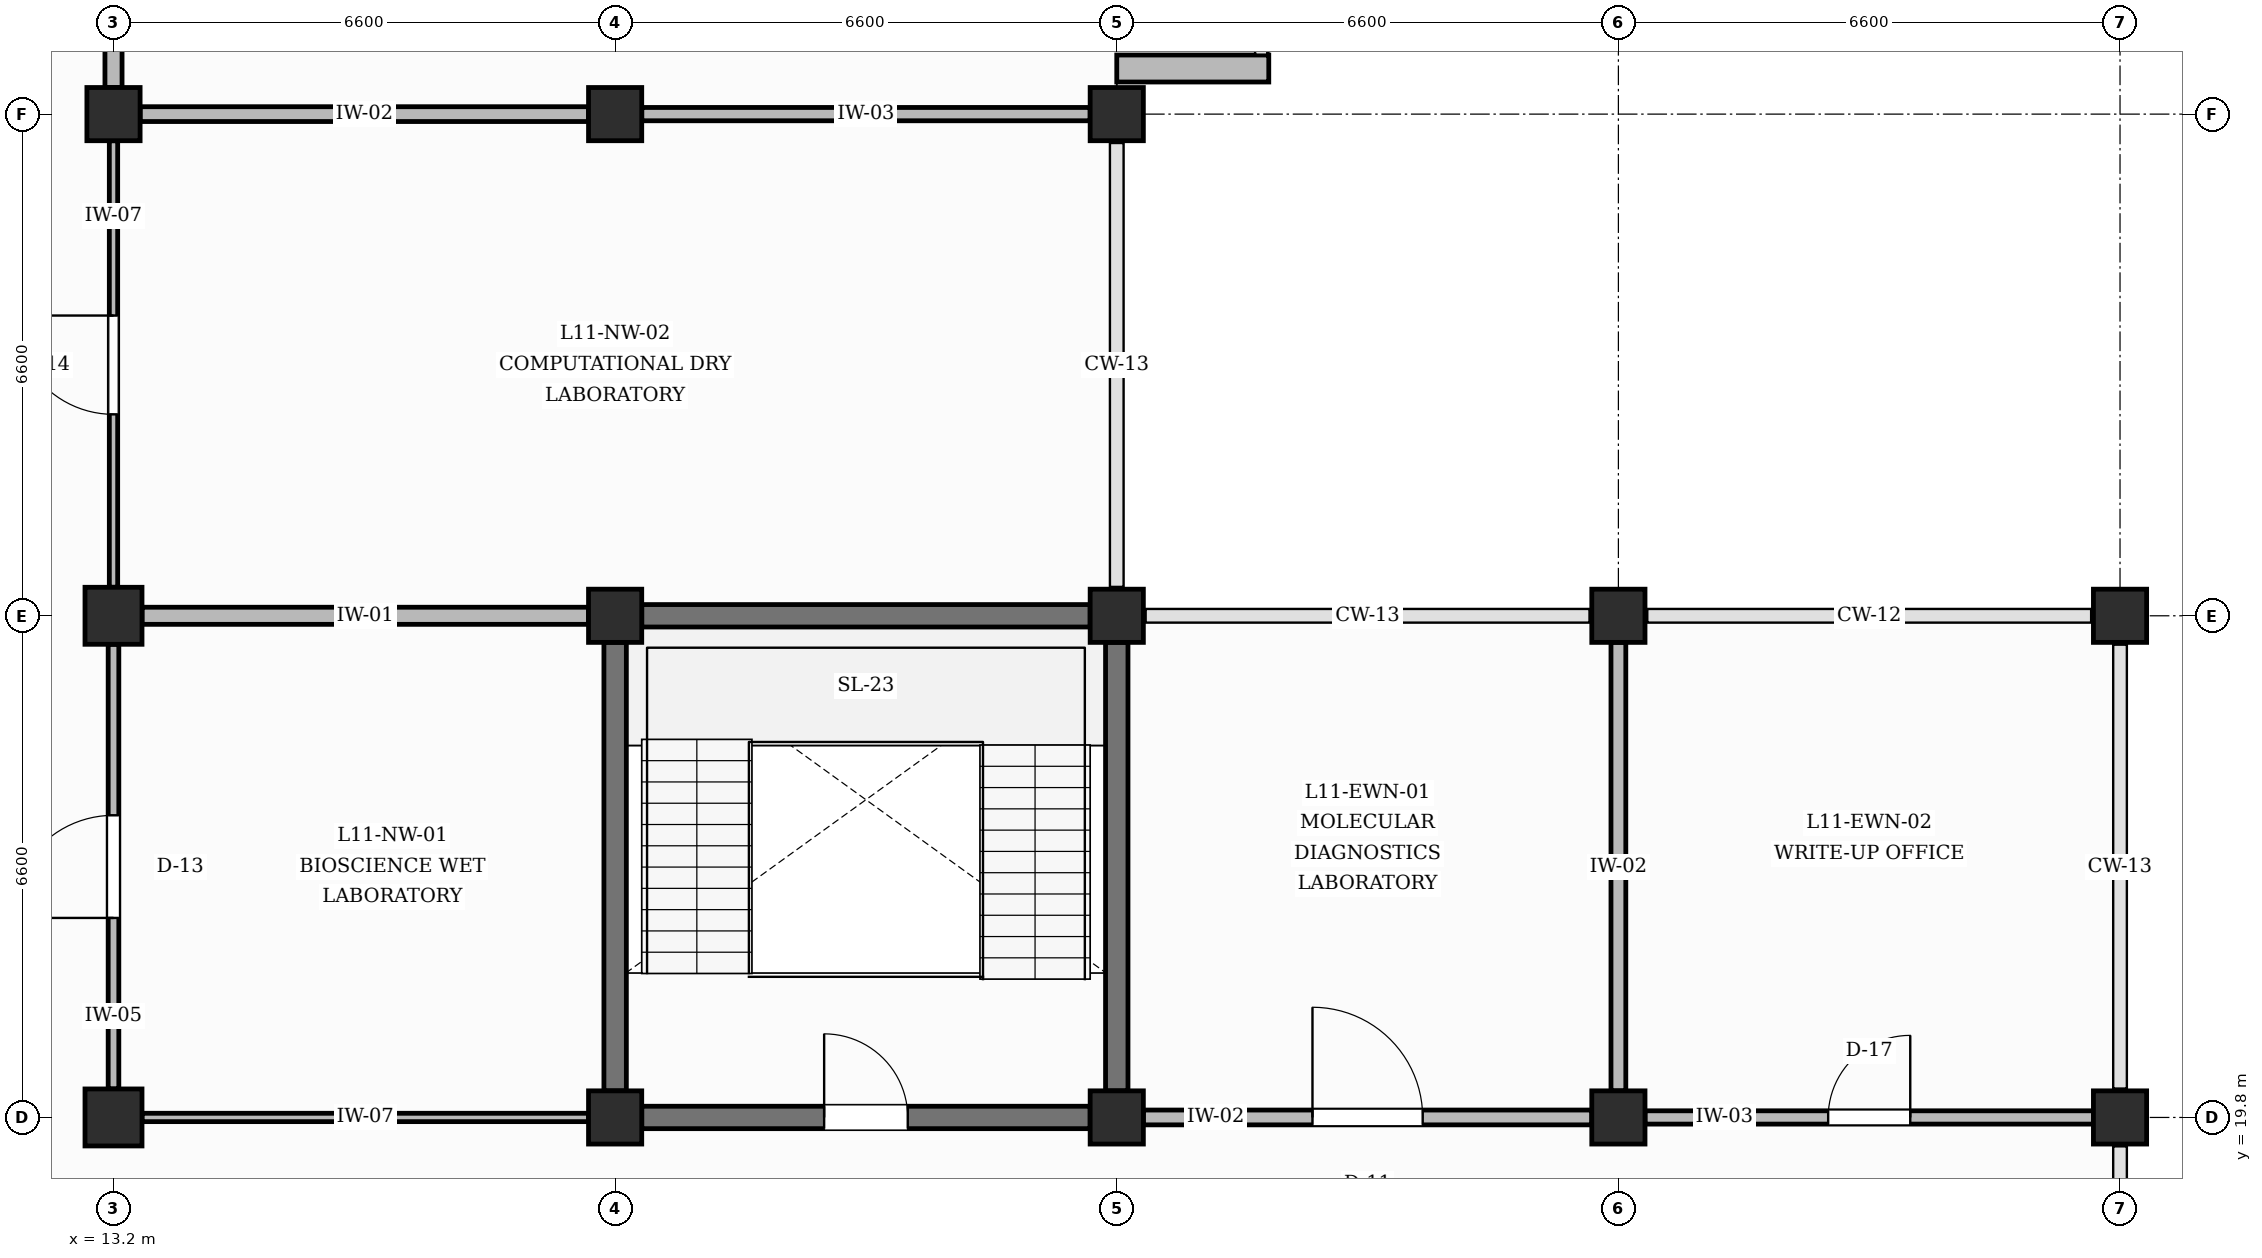
"""IFC4 building model, lengths in metres.
Left out: names, types, materials, properties, quantities, classifications, styles, units other than length and angle.
Written with IfcOpenShell. Run it as: python <this file> out.ifc"""

import sys

from ifc_helpers import new_model, si_unit, direction, frame, frame_2d, origin, origin_2d, place, context, subcontext, project, spatial, rectangle, extrude, element, fill, save


model = new_model("IFC4")
c1 = context("Model", 3, precision=1e-05, world=origin(), true_north=direction((0.0, 1.0)))
c2 = subcontext(c1, "Body", "Model", "MODEL_VIEW")
j1 = project(units=[si_unit("LENGTHUNIT", "METRE"), si_unit("PLANEANGLEUNIT", "RADIAN")], contexts=[c1])
p1 = place(None, origin())
s1 = spatial("IfcSite", under=j1, at=p1, CompositionType="ELEMENT")
p2 = place(p1, origin())
s2 = spatial("IfcBuilding", under=s1, at=p2, CompositionType="ELEMENT")
p3 = place(p2, frame((0.0, 0.0, 48.0)))
s3 = spatial("IfcBuildingStorey", under=s2, at=p3, CompositionType="ELEMENT", Elevation=48.0)
for number, where, z_axis, x_axis in (
    (1, (13.2, 19.8, 0.0), (0.0, 0.0, 1.0), (1.0, 0.0, 0.0)),
    (2, (13.2, 26.4, 0.0), (0.0, 0.0, 1.0), (1.0, 0.0, 0.0)),
):
    element("IfcColumn", number, at=place(p3, frame(where, z_axis=z_axis, x_axis=x_axis)), inside=s3, PredefinedType="COLUMN", context=c2, shape_type="SweptSolid", body=[
        extrude(rectangle(XDim=0.75, YDim=0.75, at=origin_2d()), origin(), (0.0, 0.0, 1.0), 4.2),
    ])
for number, where, z_axis, x_axis in (
    (3, (13.2, 33.0, 0.0), (0.0, 0.0, 1.0), (1.0, 0.0, 0.0)),
    (4, (19.8, 19.8, 0.0), (0.0, 0.0, 1.0), (1.0, 0.0, 0.0)),
    (5, (19.8, 26.4, 0.0), (0.0, 0.0, 1.0), (1.0, 0.0, 0.0)),
    (6, (19.8, 33.0, 0.0), (0.0, 0.0, 1.0), (1.0, 0.0, 0.0)),
    (7, (26.4, 19.8, 0.0), (0.0, 0.0, 1.0), (1.0, 0.0, 0.0)),
    (8, (26.4, 26.4, 0.0), (0.0, 0.0, 1.0), (1.0, 0.0, 0.0)),
    (9, (26.4, 33.0, 0.0), (0.0, 0.0, 1.0), (1.0, 0.0, 0.0)),
    (10, (33.0, 19.8, 0.0), (0.0, 0.0, 1.0), (1.0, 0.0, 0.0)),
    (11, (33.0, 26.4, 0.0), (0.0, 0.0, 1.0), (1.0, 0.0, 0.0)),
    (12, (39.6, 19.8, 0.0), (0.0, 0.0, 1.0), (1.0, 0.0, 0.0)),
    (13, (39.6, 26.4, 0.0), (0.0, 0.0, 1.0), (1.0, 0.0, 0.0)),
):
    element("IfcColumn", number, at=place(p3, frame(where, z_axis=z_axis, x_axis=x_axis)), inside=s3, PredefinedType="COLUMN", context=c2, shape_type="SweptSolid", body=[
        extrude(rectangle(XDim=0.7, YDim=0.7, at=origin_2d()), origin(), (0.0, 0.0, 1.0), 4.2),
    ])
p4 = place(p3, frame((26.4, 33.6, 0.0), z_axis=(0.0, 0.0, 1.0), x_axis=(1.0, 0.0, 0.0)))
e14 = element("IfcWall", 14, at=p4, inside=s3, PredefinedType="SOLIDWALL", context=c2, shape_type="SweptSolid", body=[
    extrude(rectangle(XDim=2.0, YDim=0.355, at=frame_2d((1.0, 0.0))), origin(), (0.0, 0.0, 1.0), 3.29),
])
p5 = place(p3, frame((20.15, 19.8, 0.0), z_axis=(0.0, 0.0, 1.0), x_axis=(1.0, 0.0, 0.0)))
e15 = element("IfcWall", 15, at=p5, inside=s3, PredefinedType="SHEAR", context=c2, shape_type="SweptSolid", body=[
    extrude(rectangle(XDim=5.9, YDim=0.295, at=frame_2d((2.95, 0.0))), origin(), (0.0, 0.0, 1.0), 3.29),
])
p6 = place(p5, frame((2.4, 0.0, 0.0)))
e16 = element("IfcOpeningElement", 16, at=p6, cuts=e15, PredefinedType="OPENING", context=c2, shape_type="SweptSolid", body=[
    extrude(rectangle(XDim=1.1, YDim=2.15, at=frame_2d((0.55, 1.075))), frame((0.0, 0.157, 0.0), z_axis=(0.0, -1.0, 0.0), x_axis=(1.0, 0.0, 0.0)), (0.0, 0.0, 1.0), 0.315),
])
for number, where, z_axis, x_axis in (
    (17, (20.15, 26.4, 0.0), (0.0, 0.0, 1.0), (1.0, 0.0, 0.0)),
    (18, (19.8, 20.15, 0.0), (0.0, 0.0, 1.0), (0.0, 1.0, 0.0)),
    (19, (26.4, 20.15, 0.0), (0.0, 0.0, 1.0), (0.0, 1.0, 0.0)),
):
    element("IfcWall", number, at=place(p3, frame(where, z_axis=z_axis, x_axis=x_axis)), inside=s3, PredefinedType="SHEAR", context=c2, shape_type="SweptSolid", body=[
        extrude(rectangle(XDim=5.9, YDim=0.295, at=frame_2d((2.95, 0.0))), origin(), (0.0, 0.0, 1.0), 3.29),
    ])
p7 = place(p3, frame((13.2, 20.175, 0.0), z_axis=(0.0, 0.0, 1.0), x_axis=(0.0, 1.0, 0.0)))
e20 = element("IfcWall", 20, at=p7, inside=s3, PredefinedType="PARTITIONING", context=c2, shape_type="SweptSolid", body=[
    extrude(rectangle(XDim=5.85, YDim=0.14, at=frame_2d((2.925, 0.0))), origin(), (0.0, 0.0, 1.0), 3.29),
])
p8 = place(p7, frame((2.25, 0.0, 0.0)))
e21 = element("IfcOpeningElement", 21, at=p8, cuts=e20, PredefinedType="OPENING", context=c2, shape_type="SweptSolid", body=[
    extrude(rectangle(XDim=1.35, YDim=2.3, at=frame_2d((0.675, 1.15))), frame((0.0, 0.08, 0.0), z_axis=(0.0, -1.0, 0.0), x_axis=(1.0, 0.0, 0.0)), (0.0, 0.0, 1.0), 0.16),
])
p9 = place(p3, frame((13.2, 26.775, 0.0), z_axis=(0.0, 0.0, 1.0), x_axis=(0.0, 1.0, 0.0)))
e22 = element("IfcWall", 22, at=p9, inside=s3, PredefinedType="PARTITIONING", context=c2, shape_type="SweptSolid", body=[
    extrude(rectangle(XDim=5.875, YDim=0.11, at=frame_2d((2.938, 0.0))), origin(), (0.0, 0.0, 1.0), 3.29),
])
p10 = place(p9, frame((2.275, 0.0, 0.0)))
e23 = element("IfcOpeningElement", 23, at=p10, cuts=e22, PredefinedType="OPENING", context=c2, shape_type="SweptSolid", body=[
    extrude(rectangle(XDim=1.3, YDim=2.3, at=frame_2d((0.65, 1.15))), frame((0.0, 0.065, 0.0), z_axis=(0.0, -1.0, 0.0), x_axis=(1.0, 0.0, 0.0)), (0.0, 0.0, 1.0), 0.13),
])
p11 = place(p3, frame((13.2, 33.35, 0.0), z_axis=(0.0, 0.0, 1.0), x_axis=(0.0, 1.0, 0.0)))
e24 = element("IfcWall", 24, at=p11, inside=s3, PredefinedType="PARTITIONING", context=c2, shape_type="SweptSolid", body=[
    extrude(rectangle(XDim=5.9, YDim=0.225, at=frame_2d((2.95, 0.0))), origin(), (0.0, 0.0, 1.0), 3.29),
])
p12 = place(p11, frame((2.46, 0.0, 0.0)))
e25 = element("IfcOpeningElement", 25, at=p12, cuts=e24, PredefinedType="OPENING", context=c2, shape_type="SweptSolid", body=[
    extrude(rectangle(XDim=0.98, YDim=2.15, at=frame_2d((0.49, 1.075))), frame((0.0, 0.123, 0.0), z_axis=(0.0, -1.0, 0.0), x_axis=(1.0, 0.0, 0.0)), (0.0, 0.0, 1.0), 0.245),
])
p13 = place(p3, frame((13.575, 19.8, 0.0), z_axis=(0.0, 0.0, 1.0), x_axis=(1.0, 0.0, 0.0)))
e26 = element("IfcWall", 26, at=p13, inside=s3, PredefinedType="PARTITIONING", context=c2, shape_type="SweptSolid", body=[
    extrude(rectangle(XDim=5.875, YDim=0.11, at=frame_2d((2.938, 0.0))), origin(), (0.0, 0.0, 1.0), 3.29),
])
p14 = place(p3, frame((13.575, 26.4, 0.0), z_axis=(0.0, 0.0, 1.0), x_axis=(1.0, 0.0, 0.0)))
e27 = element("IfcWall", 27, at=p14, inside=s3, PredefinedType="PARTITIONING", context=c2, shape_type="SweptSolid", body=[
    extrude(rectangle(XDim=5.875, YDim=0.225, at=frame_2d((2.938, 0.0))), origin(), (0.0, 0.0, 1.0), 3.29),
])
p15 = place(p3, frame((13.55, 33.0, 0.0), z_axis=(0.0, 0.0, 1.0), x_axis=(1.0, 0.0, 0.0)))
e28 = element("IfcWall", 28, at=p15, inside=s3, PredefinedType="PARTITIONING", context=c2, shape_type="SweptSolid", body=[
    extrude(rectangle(XDim=5.9, YDim=0.195, at=frame_2d((2.95, 0.0))), origin(), (0.0, 0.0, 1.0), 3.29),
])
p16 = place(p3, frame((20.15, 33.0, 0.0), z_axis=(0.0, 0.0, 1.0), x_axis=(1.0, 0.0, 0.0)))
e29 = element("IfcWall", 29, at=p16, inside=s3, PredefinedType="PARTITIONING", context=c2, shape_type="SweptSolid", body=[
    extrude(rectangle(XDim=5.9, YDim=0.175, at=frame_2d((2.95, 0.0))), origin(), (0.0, 0.0, 1.0), 3.44),
])
p17 = place(p3, frame((26.75, 19.8, 0.0), z_axis=(0.0, 0.0, 1.0), x_axis=(1.0, 0.0, 0.0)))
e30 = element("IfcWall", 30, at=p17, inside=s3, PredefinedType="PARTITIONING", context=c2, shape_type="SweptSolid", body=[
    extrude(rectangle(XDim=5.9, YDim=0.195, at=frame_2d((2.95, 0.0))), origin(), (0.0, 0.0, 1.0), 3.29),
])
p18 = place(p17, frame((2.225, 0.0, 0.0)))
e31 = element("IfcOpeningElement", 31, at=p18, cuts=e30, PredefinedType="OPENING", context=c2, shape_type="SweptSolid", body=[
    extrude(rectangle(XDim=1.45, YDim=2.25, at=frame_2d((0.725, 1.125))), frame((0.0, 0.107, 0.0), z_axis=(0.0, -1.0, 0.0), x_axis=(1.0, 0.0, 0.0)), (0.0, 0.0, 1.0), 0.215),
])
p19 = place(p3, frame((33.0, 20.15, 0.0), z_axis=(0.0, 0.0, 1.0), x_axis=(0.0, 1.0, 0.0)))
e32 = element("IfcWall", 32, at=p19, inside=s3, PredefinedType="PARTITIONING", context=c2, shape_type="SweptSolid", body=[
    extrude(rectangle(XDim=5.9, YDim=0.195, at=frame_2d((2.95, 0.0))), origin(), (0.0, 0.0, 1.0), 3.29),
])
p20 = place(p3, frame((33.35, 19.8, 0.0), z_axis=(0.0, 0.0, 1.0), x_axis=(1.0, 0.0, 0.0)))
e33 = element("IfcWall", 33, at=p20, inside=s3, PredefinedType="PARTITIONING", context=c2, shape_type="SweptSolid", body=[
    extrude(rectangle(XDim=5.9, YDim=0.175, at=frame_2d((2.95, 0.0))), origin(), (0.0, 0.0, 1.0), 3.29),
])
p21 = place(p20, frame((2.41, 0.0, 0.0)))
e34 = element("IfcOpeningElement", 34, at=p21, cuts=e33, PredefinedType="OPENING", context=c2, shape_type="SweptSolid", body=[
    extrude(rectangle(XDim=1.08, YDim=2.15, at=frame_2d((0.54, 1.075))), frame((0.0, 0.097, 0.0), z_axis=(0.0, -1.0, 0.0), x_axis=(1.0, 0.0, 0.0)), (0.0, 0.0, 1.0), 0.195),
])
p22 = place(p6, origin())
e35 = element("IfcDoor", 35, at=p22, inside=s3, OperationType="SINGLE_SWING_LEFT", PredefinedType="DOOR", context=c2, shape_type="SweptSolid", body=[
    extrude(rectangle(XDim=1.1, YDim=2.15, at=frame_2d((0.55, 1.075))), frame((0.0, 0.025, 0.0), z_axis=(0.0, -1.0, 0.0), x_axis=(1.0, 0.0, 0.0)), (0.0, 0.0, 1.0), 0.05),
])
fill(e16, e35)
p23 = place(p8, origin())
e36 = element("IfcDoor", 36, at=p23, inside=s3, OperationType="SINGLE_SWING_LEFT", PredefinedType="DOOR", context=c2, shape_type="SweptSolid", body=[
    extrude(rectangle(XDim=1.35, YDim=2.3, at=frame_2d((0.675, 1.15))), frame((0.0, 0.025, 0.0), z_axis=(0.0, -1.0, 0.0), x_axis=(1.0, 0.0, 0.0)), (0.0, 0.0, 1.0), 0.05),
])
fill(e21, e36)
p24 = place(p10, origin())
e37 = element("IfcDoor", 37, at=p24, inside=s3, OperationType="SINGLE_SWING_RIGHT", PredefinedType="DOOR", context=c2, shape_type="SweptSolid", body=[
    extrude(rectangle(XDim=1.3, YDim=2.3, at=frame_2d((0.65, 1.15))), frame((0.0, 0.025, 0.0), z_axis=(0.0, -1.0, 0.0), x_axis=(1.0, 0.0, 0.0)), (0.0, 0.0, 1.0), 0.05),
])
fill(e23, e37)
p25 = place(p18, origin())
e38 = element("IfcDoor", 38, at=p25, inside=s3, OperationType="SINGLE_SWING_LEFT", PredefinedType="DOOR", context=c2, shape_type="SweptSolid", body=[
    extrude(rectangle(XDim=1.45, YDim=2.25, at=frame_2d((0.725, 1.125))), frame((0.0, 0.025, 0.0), z_axis=(0.0, -1.0, 0.0), x_axis=(1.0, 0.0, 0.0)), (0.0, 0.0, 1.0), 0.05),
])
fill(e31, e38)
p26 = place(p21, origin())
e39 = element("IfcDoor", 39, at=p26, inside=s3, OperationType="SINGLE_SWING_RIGHT", PredefinedType="DOOR", context=c2, shape_type="SweptSolid", body=[
    extrude(rectangle(XDim=1.08, YDim=2.15, at=frame_2d((0.54, 1.075))), frame((0.0, 0.025, 0.0), z_axis=(0.0, -1.0, 0.0), x_axis=(1.0, 0.0, 0.0)), (0.0, 0.0, 1.0), 0.05),
])
fill(e34, e39)
save(model, sys.argv[1])
